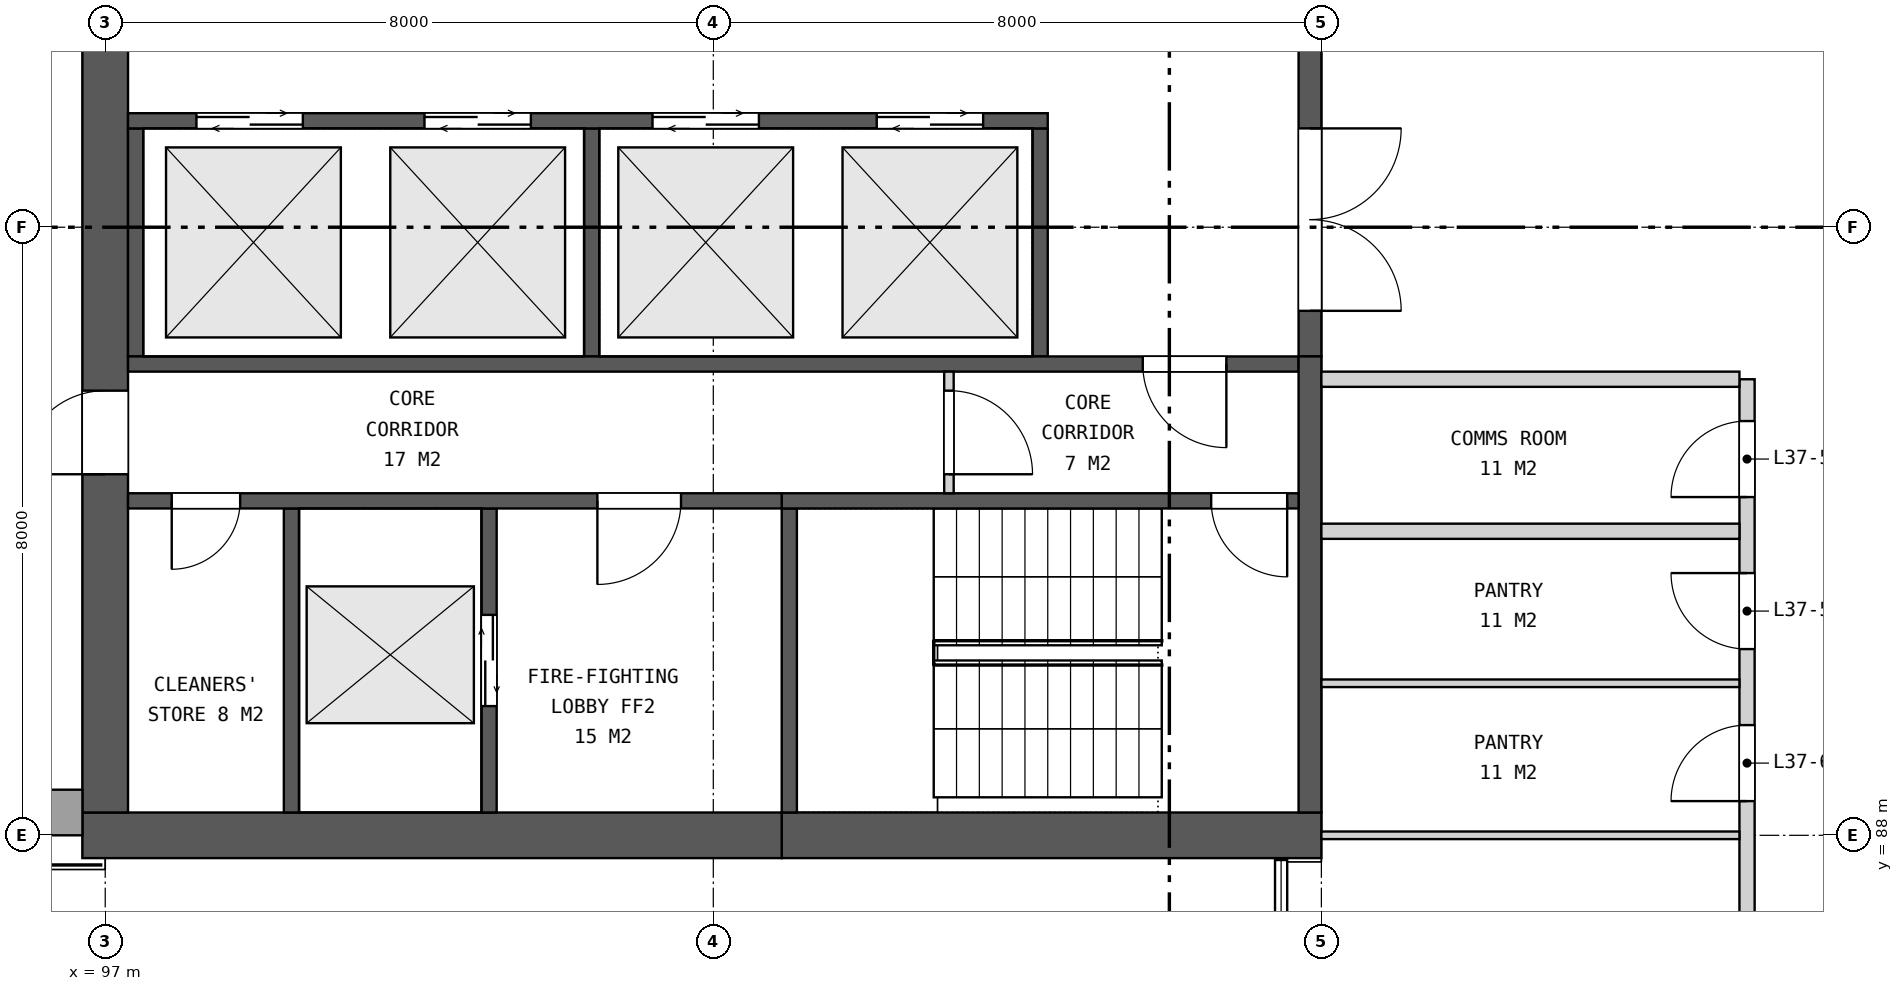
"""IFC4 building model, lengths in metres.
Left out: names, types, materials, properties, quantities, classifications, styles, units other than length and angle.
Written with IfcOpenShell. Run it as: python <this file> out.ifc"""

import sys

from ifc_helpers import new_model, si_unit, direction, frame, frame_2d, origin, place, context, subcontext, project, spatial, rectangle, extrude, element, fill, save


model = new_model("IFC4")
c1 = context("Model", 3, precision=1e-05, world=origin(), true_north=direction((0.0, 1.0)))
c2 = subcontext(c1, "Body", "Model", "MODEL_VIEW")
j1 = project(units=[si_unit("LENGTHUNIT", "METRE"), si_unit("PLANEANGLEUNIT", "RADIAN")], contexts=[c1])
p1 = place(None, origin())
s1 = spatial("IfcSite", under=j1, at=p1, CompositionType="ELEMENT")
p2 = place(p1, origin())
s2 = spatial("IfcBuilding", under=s1, at=p2, CompositionType="ELEMENT")
p3 = place(p2, frame((0.0, 0.0, 178.9)))
s3 = spatial("IfcBuildingStorey", under=s2, at=p3, CompositionType="ELEMENT", Elevation=178.9)
p4 = place(p3, frame((113.0, 88.0, 0.0), z_axis=(0.0, 0.0, 1.0), x_axis=(-1.0, 0.0, 0.0)))
e1 = element("IfcWall", 1, at=p4, inside=s3, PredefinedType="SHEAR", context=c2, shape_type="SweptSolid", body=[
    extrude(rectangle(XDim=7.1, YDim=0.6, at=frame_2d((3.55, 0.0))), origin(), (0.0, 0.0, 1.0), 4.2),
])
p5 = place(p3, frame((105.9, 88.0, 0.0), z_axis=(0.0, 0.0, 1.0), x_axis=(-1.0, 0.0, 0.0)))
e2 = element("IfcWall", 2, at=p5, inside=s3, PredefinedType="SHEAR", context=c2, shape_type="SweptSolid", body=[
    extrude(rectangle(XDim=9.2, YDim=0.6, at=frame_2d((4.6, 0.0))), origin(), (0.0, 0.0, 1.0), 4.2),
])
p6 = place(p3, frame((97.0, 111.7, 0.0), z_axis=(0.0, 0.0, 1.0), x_axis=(0.0, -1.0, 0.0)))
e3 = element("IfcWall", 3, at=p6, inside=s3, PredefinedType="SHEAR", context=c2, shape_type="SweptSolid", body=[
    extrude(rectangle(XDim=23.4, YDim=0.6, at=frame_2d((11.7, 0.0))), origin(), (0.0, 0.0, 1.0), 4.2),
])
p7 = place(p6, frame((10.5, 0.0, 0.0)))
e4 = element("IfcOpeningElement", 4, at=p7, cuts=e3, PredefinedType="OPENING", context=c2, shape_type="SweptSolid", body=[
    extrude(rectangle(XDim=2.4, YDim=2.4, at=frame_2d((1.2, 1.2))), frame((0.0, 0.31, 0.0), z_axis=(0.0, -1.0, 0.0), x_axis=(1.0, 0.0, 0.0)), (0.0, 0.0, 1.0), 0.62),
])
p8 = place(p6, frame((17.85, 0.0, 0.0)))
e5 = element("IfcOpeningElement", 5, at=p8, cuts=e3, PredefinedType="OPENING", context=c2, shape_type="SweptSolid", body=[
    extrude(rectangle(XDim=1.1, YDim=2.1, at=frame_2d((0.55, 1.05))), frame((0.0, 0.31, 0.0), z_axis=(0.0, -1.0, 0.0), x_axis=(1.0, 0.0, 0.0)), (0.0, 0.0, 1.0), 0.62),
])
p9 = place(p3, frame((112.85, 105.7, 0.0), z_axis=(0.0, 0.0, 1.0), x_axis=(0.0, -1.0, 0.0)))
e6 = element("IfcWall", 6, at=p9, inside=s3, PredefinedType="SHEAR", context=c2, shape_type="SweptSolid", body=[
    extrude(rectangle(XDim=11.4, YDim=0.3, at=frame_2d((5.7, 0.0))), origin(), (0.0, 0.0, 1.0), 4.2),
])
p10 = place(p9, frame((0.6, 0.0, 0.0)))
e7 = element("IfcOpeningElement", 7, at=p10, cuts=e6, PredefinedType="OPENING", context=c2, shape_type="SweptSolid", body=[
    extrude(rectangle(XDim=2.4, YDim=2.4, at=frame_2d((1.2, 1.2))), frame((0.0, 0.16, 0.0), z_axis=(0.0, -1.0, 0.0), x_axis=(1.0, 0.0, 0.0)), (0.0, 0.0, 1.0), 0.32),
])
p11 = place(p9, frame((4.5, 0.0, 0.0)))
e8 = element("IfcOpeningElement", 8, at=p11, cuts=e6, PredefinedType="OPENING", context=c2, shape_type="SweptSolid", body=[
    extrude(rectangle(XDim=2.4, YDim=2.4, at=frame_2d((1.2, 1.2))), frame((0.0, 0.16, 0.0), z_axis=(0.0, -1.0, 0.0), x_axis=(1.0, 0.0, 0.0)), (0.0, 0.0, 1.0), 0.32),
])
p12 = place(p9, frame((8.4, 0.0, 0.0)))
e9 = element("IfcOpeningElement", 9, at=p12, cuts=e6, PredefinedType="OPENING", context=c2, shape_type="SweptSolid", body=[
    extrude(rectangle(XDim=2.4, YDim=2.4, at=frame_2d((1.2, 1.2))), frame((0.0, 0.16, 0.0), z_axis=(0.0, -1.0, 0.0), x_axis=(1.0, 0.0, 0.0)), (0.0, 0.0, 1.0), 0.32),
])
for number, where, z_axis, x_axis in (
    (10, (109.3, 97.3, 0.0), (0.0, 0.0, 1.0), (0.0, -1.0, 0.0)),
    (11, (103.4, 97.3, 0.0), (0.0, 0.0, 1.0), (0.0, -1.0, 0.0)),
    (12, (97.4, 97.3, 0.0), (0.0, 0.0, 1.0), (0.0, -1.0, 0.0)),
):
    element("IfcWall", number, at=place(p3, frame(where, z_axis=z_axis, x_axis=x_axis)), inside=s3, PredefinedType="SHEAR", context=c2, shape_type="SweptSolid", body=[
        extrude(rectangle(XDim=3.0, YDim=0.2, at=frame_2d((1.5, 0.0))), origin(), (0.0, 0.0, 1.0), 4.2),
    ])
p13 = place(p3, frame((109.4, 97.4, 0.0), z_axis=(0.0, 0.0, 1.0), x_axis=(-1.0, 0.0, 0.0)))
e13 = element("IfcWall", 13, at=p13, inside=s3, PredefinedType="SHEAR", context=c2, shape_type="SweptSolid", body=[
    extrude(rectangle(XDim=12.1, YDim=0.2, at=frame_2d((6.05, 0.0))), origin(), (0.0, 0.0, 1.0), 4.2),
])
p14 = place(p13, frame((0.85, 0.0, 0.0)))
e14 = element("IfcOpeningElement", 14, at=p14, cuts=e13, PredefinedType="OPENING", context=c2, shape_type="SweptSolid", body=[
    extrude(rectangle(XDim=1.4, YDim=2.1, at=frame_2d((0.7, 1.05))), frame((0.0, 0.11, 0.0), z_axis=(0.0, -1.0, 0.0), x_axis=(1.0, 0.0, 0.0)), (0.0, 0.0, 1.0), 0.22),
])
p15 = place(p13, frame((3.8, 0.0, 0.0)))
e15 = element("IfcOpeningElement", 15, at=p15, cuts=e13, PredefinedType="OPENING", context=c2, shape_type="SweptSolid", body=[
    extrude(rectangle(XDim=1.4, YDim=2.1, at=frame_2d((0.7, 1.05))), frame((0.0, 0.11, 0.0), z_axis=(0.0, -1.0, 0.0), x_axis=(1.0, 0.0, 0.0)), (0.0, 0.0, 1.0), 0.22),
])
p16 = place(p13, frame((6.8, 0.0, 0.0)))
e16 = element("IfcOpeningElement", 16, at=p16, cuts=e13, PredefinedType="OPENING", context=c2, shape_type="SweptSolid", body=[
    extrude(rectangle(XDim=1.4, YDim=2.1, at=frame_2d((0.7, 1.05))), frame((0.0, 0.11, 0.0), z_axis=(0.0, -1.0, 0.0), x_axis=(1.0, 0.0, 0.0)), (0.0, 0.0, 1.0), 0.22),
])
p17 = place(p13, frame((9.8, 0.0, 0.0)))
e17 = element("IfcOpeningElement", 17, at=p17, cuts=e13, PredefinedType="OPENING", context=c2, shape_type="SweptSolid", body=[
    extrude(rectangle(XDim=1.4, YDim=2.1, at=frame_2d((0.7, 1.05))), frame((0.0, 0.11, 0.0), z_axis=(0.0, -1.0, 0.0), x_axis=(1.0, 0.0, 0.0)), (0.0, 0.0, 1.0), 0.22),
])
p18 = place(p3, frame((112.7, 94.2, 0.0), z_axis=(0.0, 0.0, 1.0), x_axis=(-1.0, 0.0, 0.0)))
e18 = element("IfcWall", 18, at=p18, inside=s3, PredefinedType="SHEAR", context=c2, shape_type="SweptSolid", body=[
    extrude(rectangle(XDim=15.4, YDim=0.2, at=frame_2d((7.7, 0.0))), origin(), (0.0, 0.0, 1.0), 4.2),
])
p19 = place(p18, frame((0.95, 0.0, 0.0)))
e19 = element("IfcOpeningElement", 19, at=p19, cuts=e18, PredefinedType="OPENING", context=c2, shape_type="SweptSolid", body=[
    extrude(rectangle(XDim=1.1, YDim=2.1, at=frame_2d((0.55, 1.05))), frame((0.0, 0.11, 0.0), z_axis=(0.0, -1.0, 0.0), x_axis=(1.0, 0.0, 0.0)), (0.0, 0.0, 1.0), 0.22),
])
p20 = place(p3, frame((112.85, 94.3, 0.0), z_axis=(0.0, 0.0, 1.0), x_axis=(0.0, -1.0, 0.0)))
e20 = element("IfcWall", 20, at=p20, inside=s3, PredefinedType="SHEAR", context=c2, shape_type="SweptSolid", body=[
    extrude(rectangle(XDim=6.0, YDim=0.3, at=frame_2d((3.0, 0.0))), origin(), (0.0, 0.0, 1.0), 4.2),
])
p21 = place(p3, frame((106.0, 92.3, 0.0), z_axis=(0.0, 0.0, 1.0), x_axis=(0.0, -1.0, 0.0)))
e21 = element("IfcWall", 21, at=p21, inside=s3, PredefinedType="SHEAR", context=c2, shape_type="SweptSolid", body=[
    extrude(rectangle(XDim=4.0, YDim=0.2, at=frame_2d((2.0, 0.0))), origin(), (0.0, 0.0, 1.0), 4.2),
])
p22 = place(p3, frame((102.05, 92.3, 0.0), z_axis=(0.0, 0.0, 1.0), x_axis=(0.0, -1.0, 0.0)))
e22 = element("IfcWall", 22, at=p22, inside=s3, PredefinedType="SHEAR", context=c2, shape_type="SweptSolid", body=[
    extrude(rectangle(XDim=4.0, YDim=0.2, at=frame_2d((2.0, 0.0))), origin(), (0.0, 0.0, 1.0), 4.2),
])
p23 = place(p22, frame((1.4, 0.0, 0.0)))
e23 = element("IfcOpeningElement", 23, at=p23, cuts=e22, PredefinedType="OPENING", context=c2, shape_type="SweptSolid", body=[
    extrude(rectangle(XDim=1.2, YDim=2.1, at=frame_2d((0.6, 1.05))), frame((0.0, 0.11, 0.0), z_axis=(0.0, -1.0, 0.0), x_axis=(1.0, 0.0, 0.0)), (0.0, 0.0, 1.0), 0.22),
])
p24 = place(p3, frame((99.45, 92.3, 0.0), z_axis=(0.0, 0.0, 1.0), x_axis=(0.0, -1.0, 0.0)))
e24 = element("IfcWall", 24, at=p24, inside=s3, PredefinedType="SHEAR", context=c2, shape_type="SweptSolid", body=[
    extrude(rectangle(XDim=4.0, YDim=0.2, at=frame_2d((2.0, 0.0))), origin(), (0.0, 0.0, 1.0), 4.2),
])
p25 = place(p3, frame((112.7, 92.4, 0.0), z_axis=(0.0, 0.0, 1.0), x_axis=(-1.0, 0.0, 0.0)))
e25 = element("IfcWall", 25, at=p25, inside=s3, PredefinedType="SHEAR", context=c2, shape_type="SweptSolid", body=[
    extrude(rectangle(XDim=6.8, YDim=0.2, at=frame_2d((3.4, 0.0))), origin(), (0.0, 0.0, 1.0), 4.2),
])
p26 = place(p25, frame((0.15, 0.0, 0.0)))
e26 = element("IfcOpeningElement", 26, at=p26, cuts=e25, PredefinedType="OPENING", context=c2, shape_type="SweptSolid", body=[
    extrude(rectangle(XDim=1.0, YDim=2.1, at=frame_2d((0.5, 1.05))), frame((0.0, 0.11, 0.0), z_axis=(0.0, -1.0, 0.0), x_axis=(1.0, 0.0, 0.0)), (0.0, 0.0, 1.0), 0.22),
])
p27 = place(p3, frame((105.9, 92.4, 0.0), z_axis=(0.0, 0.0, 1.0), x_axis=(-1.0, 0.0, 0.0)))
e27 = element("IfcWall", 27, at=p27, inside=s3, PredefinedType="SHEAR", context=c2, shape_type="SweptSolid", body=[
    extrude(rectangle(XDim=8.6, YDim=0.2, at=frame_2d((4.3, 0.0))), origin(), (0.0, 0.0, 1.0), 4.2),
])
p28 = place(p27, frame((1.325, 0.0, 0.0)))
e28 = element("IfcOpeningElement", 28, at=p28, cuts=e27, PredefinedType="OPENING", context=c2, shape_type="SweptSolid", body=[
    extrude(rectangle(XDim=1.1, YDim=2.1, at=frame_2d((0.55, 1.05))), frame((0.0, 0.11, 0.0), z_axis=(0.0, -1.0, 0.0), x_axis=(1.0, 0.0, 0.0)), (0.0, 0.0, 1.0), 0.22),
])
p29 = place(p27, frame((7.125, 0.0, 0.0)))
e29 = element("IfcOpeningElement", 29, at=p29, cuts=e27, PredefinedType="OPENING", context=c2, shape_type="SweptSolid", body=[
    extrude(rectangle(XDim=0.9, YDim=2.1, at=frame_2d((0.45, 1.05))), frame((0.0, 0.11, 0.0), z_axis=(0.0, -1.0, 0.0), x_axis=(1.0, 0.0, 0.0)), (0.0, 0.0, 1.0), 0.22),
])
p30 = place(p3, frame((108.1, 94.1, 0.0), z_axis=(0.0, 0.0, 1.0), x_axis=(0.0, -1.0, 0.0)))
e30 = element("IfcWall", 30, at=p30, inside=s3, PredefinedType="PARTITIONING", context=c2, shape_type="SweptSolid", body=[
    extrude(rectangle(XDim=1.6, YDim=0.125, at=frame_2d((0.8, 0.0))), origin(), (0.0, 0.0, 1.0), 4.2),
])
p31 = place(p30, frame((0.25, 0.0, 0.0)))
e31 = element("IfcOpeningElement", 31, at=p31, cuts=e30, PredefinedType="OPENING", context=c2, shape_type="SweptSolid", body=[
    extrude(rectangle(XDim=1.1, YDim=2.1, at=frame_2d((0.55, 1.05))), frame((0.0, 0.073, 0.0), z_axis=(0.0, -1.0, 0.0), x_axis=(1.0, 0.0, 0.0)), (0.0, 0.0, 1.0), 0.145),
])
p32 = place(p3, frame((96.7, 88.3, 0.0), z_axis=(0.0, 0.0, 1.0), x_axis=(-1.0, 0.0, 0.0)))
e32 = element("IfcWall", 32, at=p32, inside=s3, PredefinedType="SOLIDWALL", context=c2, shape_type="SweptSolid", body=[
    extrude(rectangle(XDim=7.7, YDim=0.6, at=frame_2d((3.85, 0.0))), origin(), (0.0, 0.0, 1.0), 0.6),
])
p33 = place(p3, frame((118.6, 80.075, 0.0), z_axis=(0.0, 0.0, 1.0), x_axis=(0.0, 1.0, 0.0)))
e33 = element("IfcWall", 33, at=p33, inside=s3, PredefinedType="SOLIDWALL", context=c2, shape_type="SweptSolid", body=[
    extrude(rectangle(XDim=13.925, YDim=0.2, at=frame_2d((6.962, 0.0))), origin(), (0.0, 0.0, 1.0), 3.44),
])
p34 = place(p33, frame((12.375, 0.0, 0.0)))
e34 = element("IfcOpeningElement", 34, at=p34, cuts=e33, PredefinedType="OPENING", context=c2, shape_type="SweptSolid", body=[
    extrude(rectangle(XDim=1.0, YDim=2.1, at=frame_2d((0.5, 1.05))), frame((0.0, 0.11, 0.0), z_axis=(0.0, -1.0, 0.0), x_axis=(1.0, 0.0, 0.0)), (0.0, 0.0, 1.0), 0.22),
])
p35 = place(p33, frame((10.375, 0.0, 0.0)))
e35 = element("IfcOpeningElement", 35, at=p35, cuts=e33, PredefinedType="OPENING", context=c2, shape_type="SweptSolid", body=[
    extrude(rectangle(XDim=1.0, YDim=2.1, at=frame_2d((0.5, 1.05))), frame((0.0, 0.11, 0.0), z_axis=(0.0, -1.0, 0.0), x_axis=(1.0, 0.0, 0.0)), (0.0, 0.0, 1.0), 0.22),
])
p36 = place(p33, frame((8.375, 0.0, 0.0)))
e36 = element("IfcOpeningElement", 36, at=p36, cuts=e33, PredefinedType="OPENING", context=c2, shape_type="SweptSolid", body=[
    extrude(rectangle(XDim=1.0, YDim=2.1, at=frame_2d((0.5, 1.05))), frame((0.0, 0.11, 0.0), z_axis=(0.0, -1.0, 0.0), x_axis=(1.0, 0.0, 0.0)), (0.0, 0.0, 1.0), 0.22),
])
p37 = place(p33, frame((3.45, 0.0, 0.0)))
e37 = element("IfcOpeningElement", 37, at=p37, cuts=e33, PredefinedType="OPENING", context=c2, shape_type="SweptSolid", body=[
    extrude(rectangle(XDim=1.0, YDim=2.1, at=frame_2d((0.5, 1.05))), frame((0.0, 0.11, 0.0), z_axis=(0.0, -1.0, 0.0), x_axis=(1.0, 0.0, 0.0)), (0.0, 0.0, 1.0), 0.22),
])
for number, where, z_axis, x_axis in (
    (38, (113.0, 88.0, 0.0), (0.0, 0.0, 1.0), (1.0, 0.0, 0.0)),
    (39, (113.0, 90.0, 0.0), (0.0, 0.0, 1.0), (1.0, 0.0, 0.0)),
):
    element("IfcWall", number, at=place(p3, frame(where, z_axis=z_axis, x_axis=x_axis)), inside=s3, PredefinedType="PARTITIONING", context=c2, shape_type="SweptSolid", body=[
        extrude(rectangle(XDim=5.5, YDim=0.1, at=frame_2d((2.75, 0.0))), origin(), (0.0, 0.0, 1.0), 3.44),
    ])
for number, where, z_axis, x_axis in (
    (40, (113.0, 92.0, 0.0), (0.0, 0.0, 1.0), (1.0, 0.0, 0.0)),
    (41, (113.0, 94.0, 0.0), (0.0, 0.0, 1.0), (1.0, 0.0, 0.0)),
):
    element("IfcWall", number, at=place(p3, frame(where, z_axis=z_axis, x_axis=x_axis)), inside=s3, PredefinedType="SOLIDWALL", context=c2, shape_type="SweptSolid", body=[
        extrude(rectangle(XDim=5.5, YDim=0.2, at=frame_2d((2.75, 0.0))), origin(), (0.0, 0.0, 1.0), 3.44),
    ])
p38 = place(p12, origin())
e42 = element("IfcDoor", 42, at=p38, inside=s3, OperationType="DOUBLE_DOOR_SINGLE_SWING", PredefinedType="DOOR", context=c2, shape_type="SweptSolid", body=[
    extrude(rectangle(XDim=2.4, YDim=2.4, at=frame_2d((1.2, 1.2))), frame((0.0, 0.025, 0.0), z_axis=(0.0, -1.0, 0.0), x_axis=(1.0, 0.0, 0.0)), (0.0, 0.0, 1.0), 0.05),
])
fill(e9, e42)
p39 = place(p14, origin())
e43 = element("IfcDoor", 43, at=p39, inside=s3, OperationType="DOUBLE_DOOR_SLIDING", PredefinedType="DOOR", context=c2, shape_type="SweptSolid", body=[
    extrude(rectangle(XDim=1.4, YDim=2.1, at=frame_2d((0.7, 1.05))), frame((0.0, 0.025, 0.0), z_axis=(0.0, -1.0, 0.0), x_axis=(1.0, 0.0, 0.0)), (0.0, 0.0, 1.0), 0.05),
])
fill(e14, e43)
p40 = place(p15, origin())
e44 = element("IfcDoor", 44, at=p40, inside=s3, OperationType="DOUBLE_DOOR_SLIDING", PredefinedType="DOOR", context=c2, shape_type="SweptSolid", body=[
    extrude(rectangle(XDim=1.4, YDim=2.1, at=frame_2d((0.7, 1.05))), frame((0.0, 0.025, 0.0), z_axis=(0.0, -1.0, 0.0), x_axis=(1.0, 0.0, 0.0)), (0.0, 0.0, 1.0), 0.05),
])
fill(e15, e44)
p41 = place(p16, origin())
e45 = element("IfcDoor", 45, at=p41, inside=s3, OperationType="DOUBLE_DOOR_SLIDING", PredefinedType="DOOR", context=c2, shape_type="SweptSolid", body=[
    extrude(rectangle(XDim=1.4, YDim=2.1, at=frame_2d((0.7, 1.05))), frame((0.0, 0.025, 0.0), z_axis=(0.0, -1.0, 0.0), x_axis=(1.0, 0.0, 0.0)), (0.0, 0.0, 1.0), 0.05),
])
fill(e16, e45)
p42 = place(p17, origin())
e46 = element("IfcDoor", 46, at=p42, inside=s3, OperationType="DOUBLE_DOOR_SLIDING", PredefinedType="DOOR", context=c2, shape_type="SweptSolid", body=[
    extrude(rectangle(XDim=1.4, YDim=2.1, at=frame_2d((0.7, 1.05))), frame((0.0, 0.025, 0.0), z_axis=(0.0, -1.0, 0.0), x_axis=(1.0, 0.0, 0.0)), (0.0, 0.0, 1.0), 0.05),
])
fill(e17, e46)
p43 = place(p19, origin())
e47 = element("IfcDoor", 47, at=p43, inside=s3, OperationType="SINGLE_SWING_LEFT", PredefinedType="DOOR", context=c2, shape_type="SweptSolid", body=[
    extrude(rectangle(XDim=1.1, YDim=2.1, at=frame_2d((0.55, 1.05))), frame((0.0, 0.025, 0.0), z_axis=(0.0, -1.0, 0.0), x_axis=(1.0, 0.0, 0.0)), (0.0, 0.0, 1.0), 0.05),
])
fill(e19, e47)
p44 = place(p23, origin())
e48 = element("IfcDoor", 48, at=p44, inside=s3, OperationType="DOUBLE_DOOR_SLIDING", PredefinedType="DOOR", context=c2, shape_type="SweptSolid", body=[
    extrude(rectangle(XDim=1.2, YDim=2.1, at=frame_2d((0.6, 1.05))), frame((0.0, 0.025, 0.0), z_axis=(0.0, -1.0, 0.0), x_axis=(1.0, 0.0, 0.0)), (0.0, 0.0, 1.0), 0.05),
])
fill(e23, e48)
p45 = place(p26, origin())
e49 = element("IfcDoor", 49, at=p45, inside=s3, OperationType="SINGLE_SWING_LEFT", PredefinedType="DOOR", context=c2, shape_type="SweptSolid", body=[
    extrude(rectangle(XDim=1.0, YDim=2.1, at=frame_2d((0.5, 1.05))), frame((0.0, 0.025, 0.0), z_axis=(0.0, -1.0, 0.0), x_axis=(1.0, 0.0, 0.0)), (0.0, 0.0, 1.0), 0.05),
])
fill(e26, e49)
p46 = place(p28, origin())
e50 = element("IfcDoor", 50, at=p46, inside=s3, OperationType="SINGLE_SWING_RIGHT", PredefinedType="DOOR", context=c2, shape_type="SweptSolid", body=[
    extrude(rectangle(XDim=1.1, YDim=2.1, at=frame_2d((0.55, 1.05))), frame((0.0, 0.025, 0.0), z_axis=(0.0, -1.0, 0.0), x_axis=(1.0, 0.0, 0.0)), (0.0, 0.0, 1.0), 0.05),
])
fill(e28, e50)
p47 = place(p29, origin())
e51 = element("IfcDoor", 51, at=p47, inside=s3, OperationType="SINGLE_SWING_RIGHT", PredefinedType="DOOR", context=c2, shape_type="SweptSolid", body=[
    extrude(rectangle(XDim=0.9, YDim=2.1, at=frame_2d((0.45, 1.05))), frame((0.0, 0.025, 0.0), z_axis=(0.0, -1.0, 0.0), x_axis=(1.0, 0.0, 0.0)), (0.0, 0.0, 1.0), 0.05),
])
fill(e29, e51)
p48 = place(p31, origin())
e52 = element("IfcDoor", 52, at=p48, inside=s3, OperationType="SINGLE_SWING_RIGHT", PredefinedType="DOOR", context=c2, shape_type="SweptSolid", body=[
    extrude(rectangle(XDim=1.1, YDim=2.1, at=frame_2d((0.55, 1.05))), frame((0.0, 0.025, 0.0), z_axis=(0.0, -1.0, 0.0), x_axis=(1.0, 0.0, 0.0)), (0.0, 0.0, 1.0), 0.05),
])
fill(e31, e52)
p49 = place(p8, frame((1.1, 0.0, 0.0), z_axis=(0.0, 0.0, 1.0), x_axis=(-1.0, 0.0, 0.0)))
e53 = element("IfcDoor", 53, at=p49, inside=s3, OperationType="SINGLE_SWING_LEFT", PredefinedType="DOOR", context=c2, shape_type="SweptSolid", body=[
    extrude(rectangle(XDim=1.1, YDim=2.1, at=frame_2d((0.55, 1.05))), frame((0.0, 0.025, 0.0), z_axis=(0.0, -1.0, 0.0), x_axis=(1.0, 0.0, 0.0)), (0.0, 0.0, 1.0), 0.05),
])
fill(e5, e53)
p50 = place(p34, origin())
e54 = element("IfcDoor", 54, at=p50, inside=s3, OperationType="SINGLE_SWING_LEFT", PredefinedType="DOOR", context=c2, shape_type="SweptSolid", body=[
    extrude(rectangle(XDim=1.0, YDim=2.1, at=frame_2d((0.5, 1.05))), frame((0.0, 0.025, 0.0), z_axis=(0.0, -1.0, 0.0), x_axis=(1.0, 0.0, 0.0)), (0.0, 0.0, 1.0), 0.05),
])
fill(e34, e54)
p51 = place(p35, origin())
e55 = element("IfcDoor", 55, at=p51, inside=s3, OperationType="SINGLE_SWING_RIGHT", PredefinedType="DOOR", context=c2, shape_type="SweptSolid", body=[
    extrude(rectangle(XDim=1.0, YDim=2.1, at=frame_2d((0.5, 1.05))), frame((0.0, 0.025, 0.0), z_axis=(0.0, -1.0, 0.0), x_axis=(1.0, 0.0, 0.0)), (0.0, 0.0, 1.0), 0.05),
])
fill(e35, e55)
p52 = place(p36, origin())
e56 = element("IfcDoor", 56, at=p52, inside=s3, OperationType="SINGLE_SWING_LEFT", PredefinedType="DOOR", context=c2, shape_type="SweptSolid", body=[
    extrude(rectangle(XDim=1.0, YDim=2.1, at=frame_2d((0.5, 1.05))), frame((0.0, 0.025, 0.0), z_axis=(0.0, -1.0, 0.0), x_axis=(1.0, 0.0, 0.0)), (0.0, 0.0, 1.0), 0.05),
])
fill(e36, e56)
save(model, sys.argv[1])
